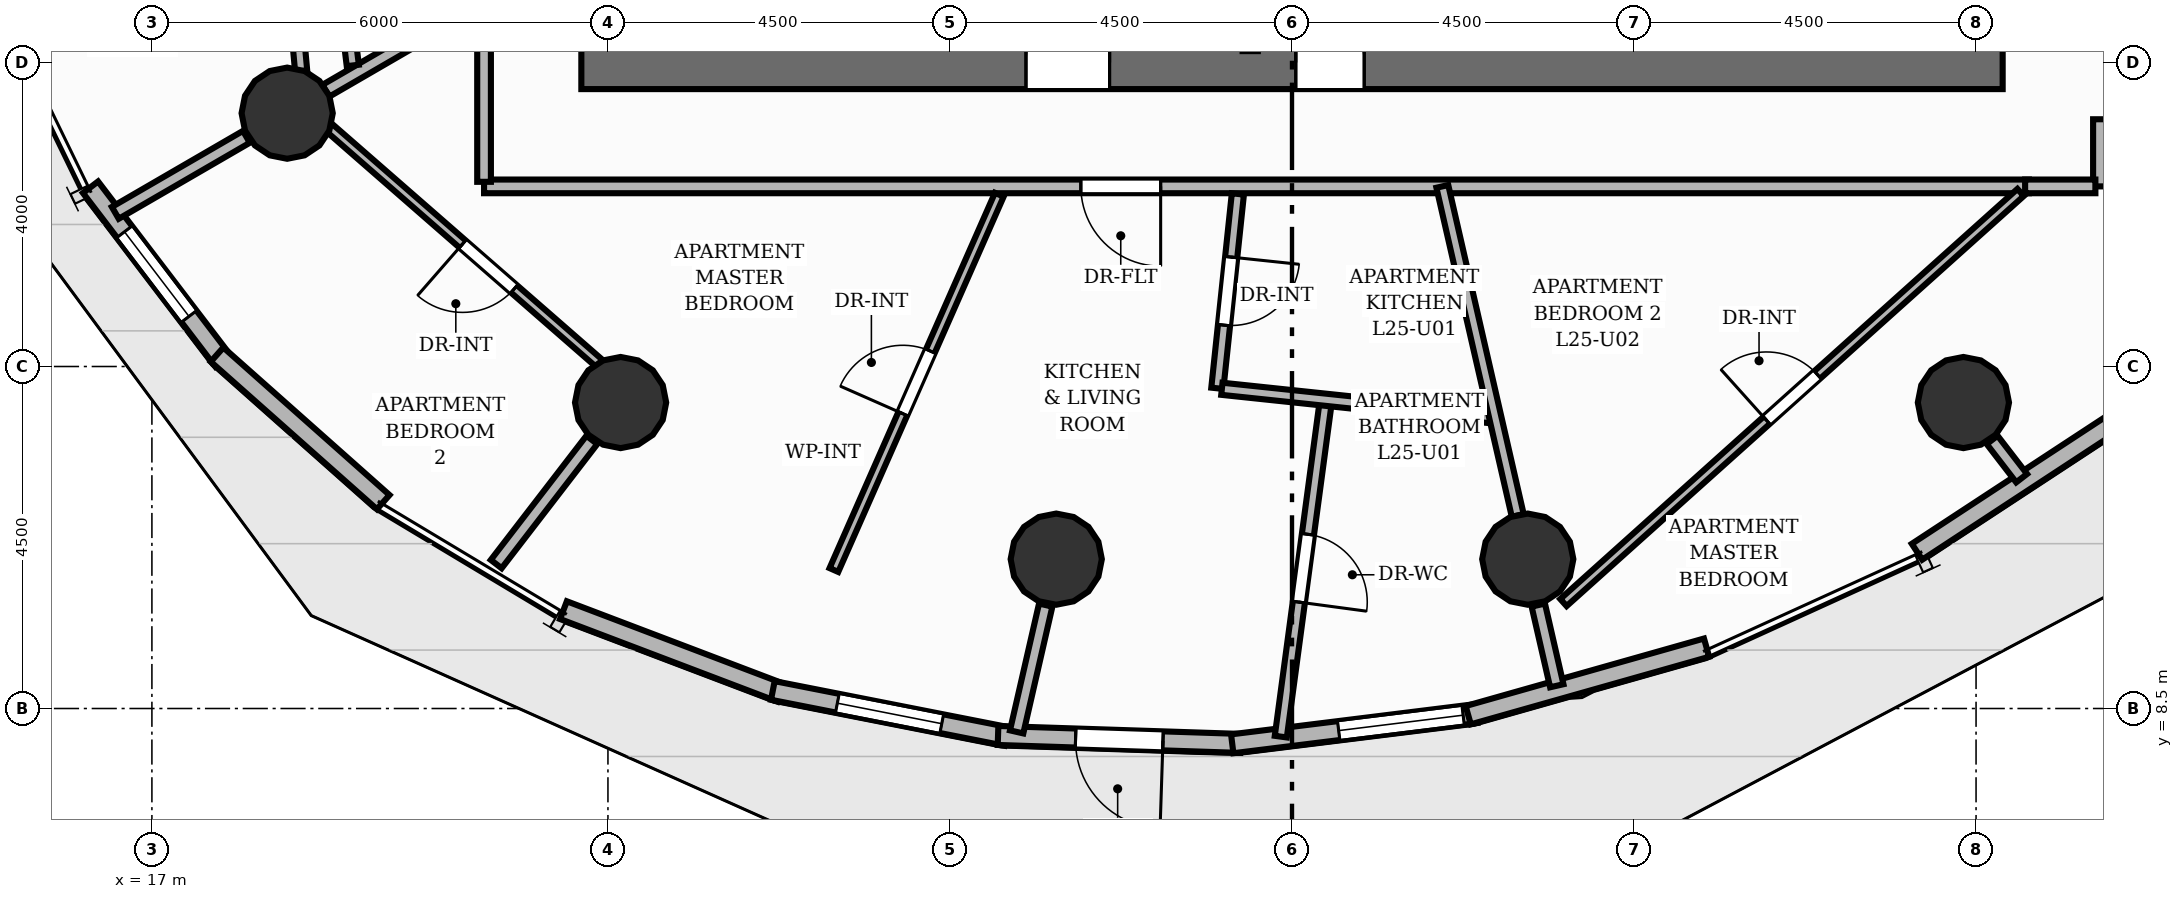
"""IFC4 building model, lengths in metres.
Left out: names, types, materials, properties, quantities, classifications, styles, units other than length and angle.
Written with IfcOpenShell. Run it as: python <this file> out.ifc"""

import sys

from ifc_helpers import new_model, si_unit, direction, frame, frame_2d, origin, origin_2d, place, context, subcontext, project, spatial, rectangle, circle, extrude, element, fill, save


model = new_model("IFC4")
c1 = context("Model", 3, precision=1e-05, world=origin(), true_north=direction((0.0, 1.0)))
c2 = subcontext(c1, "Body", "Model", "MODEL_VIEW")
j1 = project(units=[si_unit("LENGTHUNIT", "METRE"), si_unit("PLANEANGLEUNIT", "RADIAN")], contexts=[c1])
p1 = place(None, origin())
s1 = spatial("IfcSite", under=j1, at=p1, CompositionType="ELEMENT")
p2 = place(p1, origin())
s2 = spatial("IfcBuilding", under=s1, at=p2, CompositionType="ELEMENT")
p3 = place(p2, frame((0.0, 0.0, 86.88)))
s3 = spatial("IfcBuildingStorey", under=s2, at=p3, CompositionType="ELEMENT", Elevation=86.88)
p4 = place(p3, frame((22.65, 17.0, 0.0), z_axis=(0.0, 0.0, 1.0), x_axis=(1.0, 0.0, 0.0)))
e1 = element("IfcWall", 1, at=p4, inside=s3, PredefinedType="SHEAR", context=c2, shape_type="SweptSolid", body=[
    extrude(rectangle(XDim=18.7, YDim=0.7, at=frame_2d((9.35, 0.0))), origin(), (0.0, 0.0, 1.0), 3.2),
])
p5 = place(p4, frame((5.85, 0.0, 0.0)))
e2 = element("IfcOpeningElement", 2, at=p5, cuts=e1, PredefinedType="OPENING", context=c2, shape_type="SweptSolid", body=[
    extrude(rectangle(XDim=1.1, YDim=2.15, at=frame_2d((0.55, 1.075))), frame((0.0, 0.36, 0.0), z_axis=(0.0, -1.0, 0.0), x_axis=(1.0, 0.0, 0.0)), (0.0, 0.0, 1.0), 0.72),
])
p6 = place(p4, frame((9.4, 0.0, 0.0)))
e3 = element("IfcOpeningElement", 3, at=p6, cuts=e1, PredefinedType="OPENING", context=c2, shape_type="SweptSolid", body=[
    extrude(rectangle(XDim=0.9, YDim=2.1, at=frame_2d((0.45, 1.05))), frame((0.0, 0.36, 0.0), z_axis=(0.0, -1.0, 0.0), x_axis=(1.0, 0.0, 0.0)), (0.0, 0.0, 1.0), 0.72),
])
for number, where, z_axis, x_axis in (
    (4, (18.78, 16.333, 0.0), (0.0, 0.0, 1.0), (1.0, 0.0, 0.0)),
    (5, (23.167, 12.526, 0.0), (0.0, 0.0, 1.0), (1.0, 0.0, 0.0)),
    (6, (28.898, 10.465, 0.0), (0.0, 0.0, 1.0), (1.0, 0.0, 0.0)),
    (7, (35.102, 10.465, 0.0), (0.0, 0.0, 1.0), (1.0, 0.0, 0.0)),
    (8, (40.833, 12.526, 0.0), (0.0, 0.0, 1.0), (1.0, 0.0, 0.0)),
):
    element("IfcColumn", number, at=place(p3, frame(where, z_axis=z_axis, x_axis=x_axis)), inside=s3, PredefinedType="COLUMN", context=c2, shape_type="SweptSolid", body=[
        extrude(circle(Radius=0.6, at=origin_2d()), origin(), (0.0, 0.0, 1.0), 3.2),
    ])
p7 = place(p3, frame((17.935, 13.073, 0.0), z_axis=(0.0, 0.0, 1.0), x_axis=(-0.606166055027, 0.795338112838, 0.0)))
e9 = element("IfcWall", 9, at=p7, inside=s3, PredefinedType="SOLIDWALL", context=c2, shape_type="SweptSolid", body=[
    extrude(rectangle(XDim=2.874, YDim=0.25, at=frame_2d((1.437, 0.0))), origin(), (0.0, 0.0, 1.0), 2.96),
])
p8 = place(p7, frame((0.737, 0.0, 0.85)))
e10 = element("IfcOpeningElement", 10, at=p8, cuts=e9, PredefinedType="OPENING", context=c2, shape_type="SweptSolid", body=[
    extrude(rectangle(XDim=1.4, YDim=1.37, at=frame_2d((0.7, 0.685))), frame((0.0, 0.135, 0.0), z_axis=(0.0, -1.0, 0.0), x_axis=(1.0, 0.0, 0.0)), (0.0, 0.0, 1.0), 0.27),
])
p9 = place(p3, frame((20.043, 11.216, 0.0), z_axis=(0.0, 0.0, 1.0), x_axis=(-0.747828492436, 0.663891968547, 0.0)))
e11 = element("IfcWall", 11, at=p9, inside=s3, PredefinedType="SOLIDWALL", context=c2, shape_type="SweptSolid", body=[
    extrude(rectangle(XDim=2.923, YDim=0.25, at=frame_2d((1.461, 0.0))), origin(), (0.0, 0.0, 1.0), 2.96),
])
p10 = place(p3, frame((25.276, 8.707, 0.0), z_axis=(0.0, 0.0, 1.0), x_axis=(-0.934815891493, 0.355132720277, 0.0)))
e12 = element("IfcWall", 12, at=p10, inside=s3, PredefinedType="SOLIDWALL", context=c2, shape_type="SweptSolid", body=[
    extrude(rectangle(XDim=3.061, YDim=0.25, at=frame_2d((1.53, 0.0))), origin(), (0.0, 0.0, 1.0), 2.96),
])
p11 = place(p3, frame((28.242, 8.133, 0.0), z_axis=(0.0, 0.0, 1.0), x_axis=(-0.981187677549, 0.193056316721, 0.0)))
e13 = element("IfcWall", 13, at=p11, inside=s3, PredefinedType="SOLIDWALL", context=c2, shape_type="SweptSolid", body=[
    extrude(rectangle(XDim=3.131, YDim=0.25, at=frame_2d((1.565, 0.0))), origin(), (0.0, 0.0, 1.0), 2.96),
])
p12 = place(p11, frame((0.866, 0.0, 0.85)))
e14 = element("IfcOpeningElement", 14, at=p12, cuts=e13, PredefinedType="OPENING", context=c2, shape_type="SweptSolid", body=[
    extrude(rectangle(XDim=1.4, YDim=1.55, at=frame_2d((0.7, 0.775))), frame((0.0, 0.135, 0.0), z_axis=(0.0, -1.0, 0.0), x_axis=(1.0, 0.0, 0.0)), (0.0, 0.0, 1.0), 0.27),
])
p13 = place(p3, frame((31.323, 8.041, 0.0), z_axis=(0.0, 0.0, 1.0), x_axis=(-0.999464092211, 0.032734208101, 0.0)))
e15 = element("IfcWall", 15, at=p13, inside=s3, PredefinedType="SOLIDWALL", context=c2, shape_type="SweptSolid", body=[
    extrude(rectangle(XDim=3.192, YDim=0.25, at=frame_2d((1.596, 0.0))), origin(), (0.0, 0.0, 1.0), 2.96),
])
p14 = place(p13, frame((1.021, 0.0, 0.0)))
e16 = element("IfcOpeningElement", 16, at=p14, cuts=e15, PredefinedType="OPENING", context=c2, shape_type="SweptSolid", body=[
    extrude(rectangle(XDim=1.15, YDim=2.2, at=frame_2d((0.575, 1.1))), frame((0.0, 0.135, 0.0), z_axis=(0.0, -1.0, 0.0), x_axis=(1.0, 0.0, 0.0)), (0.0, 0.0, 1.0), 0.27),
])
p15 = place(p3, frame((34.425, 8.434, 0.0), z_axis=(0.0, 0.0, 1.0), x_axis=(-0.99241077266, -0.122966899235, 0.0)))
e17 = element("IfcWall", 17, at=p15, inside=s3, PredefinedType="SOLIDWALL", context=c2, shape_type="SweptSolid", body=[
    extrude(rectangle(XDim=3.236, YDim=0.25, at=frame_2d((1.618, 0.0))), origin(), (0.0, 0.0, 1.0), 2.96),
])
p16 = place(p15, frame((0.175, 0.0, 0.85)))
e18 = element("IfcOpeningElement", 18, at=p16, cuts=e17, PredefinedType="OPENING", context=c2, shape_type="SweptSolid", body=[
    extrude(rectangle(XDim=1.65, YDim=1.55, at=frame_2d((0.825, 0.775))), frame((0.0, 0.135, 0.0), z_axis=(0.0, -1.0, 0.0), x_axis=(1.0, 0.0, 0.0)), (0.0, 0.0, 1.0), 0.27),
])
p17 = place(p3, frame((37.455, 9.301, 0.0), z_axis=(0.0, 0.0, 1.0), x_axis=(-0.962134911526, -0.272573681825, 0.0)))
e19 = element("IfcWall", 19, at=p17, inside=s3, PredefinedType="SOLIDWALL", context=c2, shape_type="SweptSolid", body=[
    extrude(rectangle(XDim=3.26, YDim=0.25, at=frame_2d((1.63, 0.0))), origin(), (0.0, 0.0, 1.0), 2.96),
])
p18 = place(p3, frame((42.929, 12.337, 0.0), z_axis=(0.0, 0.0, 1.0), x_axis=(-0.836273856728, -0.548311988336, 0.0)))
e20 = element("IfcWall", 20, at=p18, inside=s3, PredefinedType="SOLIDWALL", context=c2, shape_type="SweptSolid", body=[
    extrude(rectangle(XDim=3.236, YDim=0.25, at=frame_2d((1.618, 0.0))), origin(), (0.0, 0.0, 1.0), 2.96),
])
p19 = place(p3, frame((18.243, 16.022, 0.0), z_axis=(0.0, 0.0, 1.0), x_axis=(-0.865046065875, -0.501692439563, 0.0)))
e21 = element("IfcWall", 21, at=p19, inside=s3, PredefinedType="PARTITIONING", context=c2, shape_type="SweptSolid", body=[
    extrude(rectangle(XDim=1.994, YDim=0.18, at=frame_2d((0.997, 0.0))), origin(), (0.0, 0.0, 1.0), 2.261),
])
p20 = place(p3, frame((22.788, 12.034, 0.0), z_axis=(0.0, 0.0, 1.0), x_axis=(-0.609991040385, -0.792408310564, 0.0)))
e22 = element("IfcWall", 22, at=p20, inside=s3, PredefinedType="PARTITIONING", context=c2, shape_type="SweptSolid", body=[
    extrude(rectangle(XDim=2.062, YDim=0.18, at=frame_2d((1.031, 0.0))), origin(), (0.0, 0.0, 1.0), 2.261),
])
p21 = place(p3, frame((28.76, 9.861, 0.0), z_axis=(0.0, 0.0, 1.0), x_axis=(-0.223359217097, -0.974736200281, 0.0)))
e23 = element("IfcWall", 23, at=p21, inside=s3, PredefinedType="PARTITIONING", context=c2, shape_type="SweptSolid", body=[
    extrude(rectangle(XDim=1.712, YDim=0.18, at=frame_2d((0.856, 0.0))), origin(), (0.0, 0.0, 1.0), 2.261),
])
p22 = place(p3, frame((35.24, 9.861, 0.0), z_axis=(0.0, 0.0, 1.0), x_axis=(0.223287406217, -0.974752652843, 0.0)))
e24 = element("IfcWall", 24, at=p22, inside=s3, PredefinedType="PARTITIONING", context=c2, shape_type="SweptSolid", body=[
    extrude(rectangle(XDim=1.089, YDim=0.18, at=frame_2d((0.544, 0.0))), origin(), (0.0, 0.0, 1.0), 2.261),
])
p23 = place(p3, frame((41.212, 12.034, 0.0), z_axis=(0.0, 0.0, 1.0), x_axis=(0.609970610867, -0.792424036661, 0.0)))
e25 = element("IfcWall", 25, at=p23, inside=s3, PredefinedType="PARTITIONING", context=c2, shape_type="SweptSolid", body=[
    extrude(rectangle(XDim=0.635, YDim=0.18, at=frame_2d((0.318, 0.0))), origin(), (0.0, 0.0, 1.0), 2.261),
])
p24 = place(p3, frame((41.695, 15.37, 0.0), z_axis=(0.0, 0.0, 1.0), x_axis=(-1.0, 0.0, 0.0)))
e26 = element("IfcWall", 26, at=p24, inside=s3, PredefinedType="PARTITIONING", context=c2, shape_type="SweptSolid", body=[
    extrude(rectangle(XDim=20.325, YDim=0.18, at=frame_2d((10.163, 0.0))), origin(), (0.0, 0.0, 1.0), 2.955),
])
p25 = place(p24, frame((11.424, 0.0, 0.0)))
e27 = element("IfcOpeningElement", 27, at=p25, cuts=e26, PredefinedType="OPENING", context=c2, shape_type="SweptSolid", body=[
    extrude(rectangle(XDim=1.05, YDim=2.15, at=frame_2d((0.525, 1.075))), frame((0.0, 0.1, 0.0), z_axis=(0.0, -1.0, 0.0), x_axis=(1.0, 0.0, 0.0)), (0.0, 0.0, 1.0), 0.2),
])
p26 = place(p3, frame((21.37, 15.43, 0.0), z_axis=(0.0, 0.0, 1.0), x_axis=(0.0, 1.0, 0.0)))
e28 = element("IfcWall", 28, at=p26, inside=s3, PredefinedType="PARTITIONING", context=c2, shape_type="SweptSolid", body=[
    extrude(rectangle(XDim=7.727, YDim=0.18, at=frame_2d((3.863, 0.0))), origin(), (0.0, 0.0, 1.0), 2.955),
])
p27 = place(p3, frame((42.63, 16.253, 0.0), z_axis=(0.0, 0.0, 1.0), x_axis=(0.0, -1.0, 0.0)))
e29 = element("IfcWall", 29, at=p27, inside=s3, PredefinedType="PARTITIONING", context=c2, shape_type="SweptSolid", body=[
    extrude(rectangle(XDim=0.883, YDim=0.18, at=frame_2d((0.441, 0.0))), origin(), (0.0, 0.0, 1.0), 2.955),
])
p28 = place(p3, frame((42.57, 15.37, 0.0), z_axis=(0.0, 0.0, 1.0), x_axis=(-1.0, 0.0, 0.0)))
e30 = element("IfcWall", 30, at=p28, inside=s3, PredefinedType="PARTITIONING", context=c2, shape_type="SweptSolid", body=[
    extrude(rectangle(XDim=0.925, YDim=0.18, at=frame_2d((0.462, 0.0))), origin(), (0.0, 0.0, 1.0), 2.955),
])
p29 = place(p3, frame((32.448, 12.562, 0.0), z_axis=(0.0, 0.0, 1.0), x_axis=(-0.132986130607, -0.991117898671, 0.0)))
e31 = element("IfcWall", 31, at=p29, inside=s3, PredefinedType="PLUMBINGWALL", context=c2, shape_type="SweptSolid", body=[
    extrude(rectangle(XDim=4.472, YDim=0.16, at=frame_2d((2.236, 0.0))), origin(), (0.0, 0.0, 1.0), 2.955),
])
p30 = place(p29, frame((1.786, 0.0, 0.0)))
e32 = element("IfcOpeningElement", 32, at=p30, cuts=e31, PredefinedType="OPENING", context=c2, shape_type="SweptSolid", body=[
    extrude(rectangle(XDim=0.9, YDim=2.1, at=frame_2d((0.45, 1.05))), frame((0.0, 0.09, 0.0), z_axis=(0.0, -1.0, 0.0), x_axis=(1.0, 0.0, 0.0)), (0.0, 0.0, 1.0), 0.18),
])
p31 = place(p3, frame((25.973, 10.322, 0.0), z_axis=(0.0, 0.0, 1.0), x_axis=(0.403235845427, 0.91509608947, 0.0)))
e33 = element("IfcWall", 33, at=p31, inside=s3, PredefinedType="PARTITIONING", context=c2, shape_type="SweptSolid", body=[
    extrude(rectangle(XDim=5.396, YDim=0.125, at=frame_2d((2.698, 0.0))), origin(), (0.0, 0.0, 1.0), 2.955),
])
p32 = place(p31, frame((2.248, 0.0, 0.0)))
e34 = element("IfcOpeningElement", 34, at=p32, cuts=e33, PredefinedType="OPENING", context=c2, shape_type="SweptSolid", body=[
    extrude(rectangle(XDim=0.9, YDim=2.1, at=frame_2d((0.45, 1.05))), frame((0.0, 0.073, 0.0), z_axis=(0.0, -1.0, 0.0), x_axis=(1.0, 0.0, 0.0)), (0.0, 0.0, 1.0), 0.145),
])
p33 = place(p3, frame((31.288, 15.271, 0.0), z_axis=(0.0, 0.0, 1.0), x_axis=(-0.105094954285, -0.994462191631, 0.0)))
e35 = element("IfcWall", 35, at=p33, inside=s3, PredefinedType="PLUMBINGWALL", context=c2, shape_type="SweptSolid", body=[
    extrude(rectangle(XDim=2.572, YDim=0.16, at=frame_2d((1.286, 0.0))), origin(), (0.0, 0.0, 1.0), 2.642),
])
p34 = place(p33, frame((0.836, 0.0, 0.0)))
e36 = element("IfcOpeningElement", 36, at=p34, cuts=e35, PredefinedType="OPENING", context=c2, shape_type="SweptSolid", body=[
    extrude(rectangle(XDim=0.9, YDim=2.1, at=frame_2d((0.45, 1.05))), frame((0.0, 0.09, 0.0), z_axis=(0.0, -1.0, 0.0), x_axis=(1.0, 0.0, 0.0)), (0.0, 0.0, 1.0), 0.18),
])
p35 = place(p3, frame((31.077, 12.707, 0.0), z_axis=(0.0, 0.0, 1.0), x_axis=(0.994472124215, -0.105000924563, 0.0)))
e37 = element("IfcWall", 37, at=p35, inside=s3, PredefinedType="PLUMBINGWALL", context=c2, shape_type="SweptSolid", body=[
    extrude(rectangle(XDim=3.618, YDim=0.16, at=frame_2d((1.809, 0.0))), origin(), (0.0, 0.0, 1.0), 2.955),
])
p36 = place(p3, frame((33.978, 15.37, 0.0), z_axis=(0.0, 0.0, 1.0), x_axis=(0.223321757884, -0.974744783241, 0.0)))
e38 = element("IfcWall", 38, at=p36, inside=s3, PredefinedType="PLUMBINGWALL", context=c2, shape_type="SweptSolid", body=[
    extrude(rectangle(XDim=4.442, YDim=0.16, at=frame_2d((2.221, 0.0))), origin(), (0.0, 0.0, 1.0), 2.261),
])
p37 = place(p3, frame((22.888, 13.04, 0.0), z_axis=(0.0, 0.0, 1.0), x_axis=(-0.753425123405, 0.657533712765, 0.0)))
e39 = element("IfcWall", 39, at=p37, inside=s3, PredefinedType="PARTITIONING", context=c2, shape_type="SweptSolid", body=[
    extrude(rectangle(XDim=4.72, YDim=0.125, at=frame_2d((2.36, 0.0))), origin(), (0.0, 0.0, 1.0), 2.404),
])
p38 = place(p37, frame((1.49, 0.0, 0.0)))
e40 = element("IfcOpeningElement", 40, at=p38, cuts=e39, PredefinedType="OPENING", context=c2, shape_type="SweptSolid", body=[
    extrude(rectangle(XDim=0.9, YDim=2.1, at=frame_2d((0.45, 1.05))), frame((0.0, 0.073, 0.0), z_axis=(0.0, -1.0, 0.0), x_axis=(1.0, 0.0, 0.0)), (0.0, 0.0, 1.0), 0.145),
])
p39 = place(p3, frame((19.288, 16.628, 0.0), z_axis=(0.0, 0.0, 1.0), x_axis=(0.86502326608, 0.501731750182, 0.0)))
e41 = element("IfcWall", 41, at=p39, inside=s3, PredefinedType="PARTITIONING", context=c2, shape_type="SweptSolid", body=[
    extrude(rectangle(XDim=2.407, YDim=0.18, at=frame_2d((1.204, 0.0))), origin(), (0.0, 0.0, 1.0), 2.261),
])
p40 = place(p3, frame((35.571, 9.894, 0.0), z_axis=(0.0, 0.0, 1.0), x_axis=(0.744379363772, 0.667756963865, 0.0)))
e42 = element("IfcWall", 42, at=p40, inside=s3, PredefinedType="PARTITIONING", context=c2, shape_type="SweptSolid", body=[
    extrude(rectangle(XDim=8.08, YDim=0.125, at=frame_2d((4.04, 0.0))), origin(), (0.0, 0.0, 1.0), 2.404),
])
p41 = place(p40, frame((3.59, 0.0, 0.0)))
e43 = element("IfcOpeningElement", 43, at=p41, cuts=e42, PredefinedType="OPENING", context=c2, shape_type="SweptSolid", body=[
    extrude(rectangle(XDim=0.9, YDim=2.1, at=frame_2d((0.45, 1.05))), frame((0.0, 0.073, 0.0), z_axis=(0.0, -1.0, 0.0), x_axis=(1.0, 0.0, 0.0)), (0.0, 0.0, 1.0), 0.145),
])
p42 = place(p3, frame((18.964, 16.887, 0.0), z_axis=(0.0, 0.0, 1.0), x_axis=(-0.091023836021, 0.995848714051, 0.0)))
e44 = element("IfcWall", 44, at=p42, inside=s3, PredefinedType="PLUMBINGWALL", context=c2, shape_type="SweptSolid", body=[
    extrude(rectangle(XDim=3.157, YDim=0.16, at=frame_2d((1.579, 0.0))), origin(), (0.0, 0.0, 1.0), 2.955),
])
p43 = place(p3, frame((18.935, 22.782, 0.0), z_axis=(0.0, 0.0, 1.0), x_axis=(0.120703145243, -0.992688647426, 0.0)))
e45 = element("IfcWall", 45, at=p43, inside=s3, PredefinedType="PLUMBINGWALL", context=c2, shape_type="SweptSolid", body=[
    extrude(rectangle(XDim=5.864, YDim=0.16, at=frame_2d((2.932, 0.0))), origin(), (0.0, 0.0, 1.0), 2.955),
])
p44 = place(p43, frame((1.642, 0.0, 0.0)))
e46 = element("IfcOpeningElement", 46, at=p44, cuts=e45, PredefinedType="OPENING", context=c2, shape_type="SweptSolid", body=[
    extrude(rectangle(XDim=0.9, YDim=2.1, at=frame_2d((0.45, 1.05))), frame((0.0, 0.09, 0.0), z_axis=(0.0, -1.0, 0.0), x_axis=(1.0, 0.0, 0.0)), (0.0, 0.0, 1.0), 0.18),
])
p45 = place(p14, origin())
e47 = element("IfcDoor", 47, at=p45, inside=s3, OperationType="SINGLE_SWING_LEFT", PredefinedType="DOOR", context=c2, shape_type="SweptSolid", body=[
    extrude(rectangle(XDim=1.15, YDim=2.2, at=frame_2d((0.575, 1.1))), frame((0.0, 0.025, 0.0), z_axis=(0.0, -1.0, 0.0), x_axis=(1.0, 0.0, 0.0)), (0.0, 0.0, 1.0), 0.05),
])
fill(e16, e47)
p46 = place(p8, origin())
e48 = element("IfcWindow", 48, at=p46, inside=s3, PartitioningType="SINGLE_PANEL", PredefinedType="WINDOW", context=c2, shape_type="SweptSolid", body=[
    extrude(rectangle(XDim=1.4, YDim=1.37, at=frame_2d((0.7, 0.685))), frame((0.0, 0.03, 0.0), z_axis=(0.0, -1.0, 0.0), x_axis=(1.0, 0.0, 0.0)), (0.0, 0.0, 1.0), 0.06),
])
fill(e10, e48)
p47 = place(p12, origin())
e49 = element("IfcWindow", 49, at=p47, inside=s3, PartitioningType="SINGLE_PANEL", PredefinedType="WINDOW", context=c2, shape_type="SweptSolid", body=[
    extrude(rectangle(XDim=1.4, YDim=1.55, at=frame_2d((0.7, 0.775))), frame((0.0, 0.03, 0.0), z_axis=(0.0, -1.0, 0.0), x_axis=(1.0, 0.0, 0.0)), (0.0, 0.0, 1.0), 0.06),
])
fill(e14, e49)
p48 = place(p16, origin())
e50 = element("IfcWindow", 50, at=p48, inside=s3, PartitioningType="SINGLE_PANEL", PredefinedType="WINDOW", context=c2, shape_type="SweptSolid", body=[
    extrude(rectangle(XDim=1.65, YDim=1.55, at=frame_2d((0.825, 0.775))), frame((0.0, 0.03, 0.0), z_axis=(0.0, -1.0, 0.0), x_axis=(1.0, 0.0, 0.0)), (0.0, 0.0, 1.0), 0.06),
])
fill(e18, e50)
p49 = place(p5, origin())
e51 = element("IfcDoor", 51, at=p49, inside=s3, OperationType="SINGLE_SWING_RIGHT", PredefinedType="DOOR", context=c2, shape_type="SweptSolid", body=[
    extrude(rectangle(XDim=1.1, YDim=2.15, at=frame_2d((0.55, 1.075))), frame((0.0, 0.025, 0.0), z_axis=(0.0, -1.0, 0.0), x_axis=(1.0, 0.0, 0.0)), (0.0, 0.0, 1.0), 0.05),
])
fill(e2, e51)
p50 = place(p6, origin())
e52 = element("IfcDoor", 52, at=p50, inside=s3, OperationType="SINGLE_SWING_LEFT", PredefinedType="DOOR", context=c2, shape_type="SweptSolid", body=[
    extrude(rectangle(XDim=0.9, YDim=2.1, at=frame_2d((0.45, 1.05))), frame((0.0, 0.025, 0.0), z_axis=(0.0, -1.0, 0.0), x_axis=(1.0, 0.0, 0.0)), (0.0, 0.0, 1.0), 0.05),
])
fill(e3, e52)
p51 = place(p25, origin())
e53 = element("IfcDoor", 53, at=p51, inside=s3, OperationType="SINGLE_SWING_LEFT", PredefinedType="DOOR", context=c2, shape_type="SweptSolid", body=[
    extrude(rectangle(XDim=1.05, YDim=2.15, at=frame_2d((0.525, 1.075))), frame((0.0, 0.025, 0.0), z_axis=(0.0, -1.0, 0.0), x_axis=(1.0, 0.0, 0.0)), (0.0, 0.0, 1.0), 0.05),
])
fill(e27, e53)
p52 = place(p30, origin())
e54 = element("IfcDoor", 54, at=p52, inside=s3, OperationType="SINGLE_SWING_RIGHT", PredefinedType="DOOR", context=c2, shape_type="SweptSolid", body=[
    extrude(rectangle(XDim=0.9, YDim=2.1, at=frame_2d((0.45, 1.05))), frame((0.0, 0.025, 0.0), z_axis=(0.0, -1.0, 0.0), x_axis=(1.0, 0.0, 0.0)), (0.0, 0.0, 1.0), 0.05),
])
fill(e32, e54)
p53 = place(p32, origin())
e55 = element("IfcDoor", 55, at=p53, inside=s3, OperationType="SINGLE_SWING_LEFT", PredefinedType="DOOR", context=c2, shape_type="SweptSolid", body=[
    extrude(rectangle(XDim=0.9, YDim=2.1, at=frame_2d((0.45, 1.05))), frame((0.0, 0.025, 0.0), z_axis=(0.0, -1.0, 0.0), x_axis=(1.0, 0.0, 0.0)), (0.0, 0.0, 1.0), 0.05),
])
fill(e34, e55)
p54 = place(p38, origin())
e56 = element("IfcDoor", 56, at=p54, inside=s3, OperationType="SINGLE_SWING_RIGHT", PredefinedType="DOOR", context=c2, shape_type="SweptSolid", body=[
    extrude(rectangle(XDim=0.9, YDim=2.1, at=frame_2d((0.45, 1.05))), frame((0.0, 0.025, 0.0), z_axis=(0.0, -1.0, 0.0), x_axis=(1.0, 0.0, 0.0)), (0.0, 0.0, 1.0), 0.05),
])
fill(e40, e56)
p55 = place(p34, origin())
e57 = element("IfcDoor", 57, at=p55, inside=s3, OperationType="SINGLE_SWING_LEFT", PredefinedType="DOOR", context=c2, shape_type="SweptSolid", body=[
    extrude(rectangle(XDim=0.9, YDim=2.1, at=frame_2d((0.45, 1.05))), frame((0.0, 0.025, 0.0), z_axis=(0.0, -1.0, 0.0), x_axis=(1.0, 0.0, 0.0)), (0.0, 0.0, 1.0), 0.05),
])
fill(e36, e57)
p56 = place(p41, origin())
e58 = element("IfcDoor", 58, at=p56, inside=s3, OperationType="SINGLE_SWING_LEFT", PredefinedType="DOOR", context=c2, shape_type="SweptSolid", body=[
    extrude(rectangle(XDim=0.9, YDim=2.1, at=frame_2d((0.45, 1.05))), frame((0.0, 0.025, 0.0), z_axis=(0.0, -1.0, 0.0), x_axis=(1.0, 0.0, 0.0)), (0.0, 0.0, 1.0), 0.05),
])
fill(e43, e58)
save(model, sys.argv[1])
